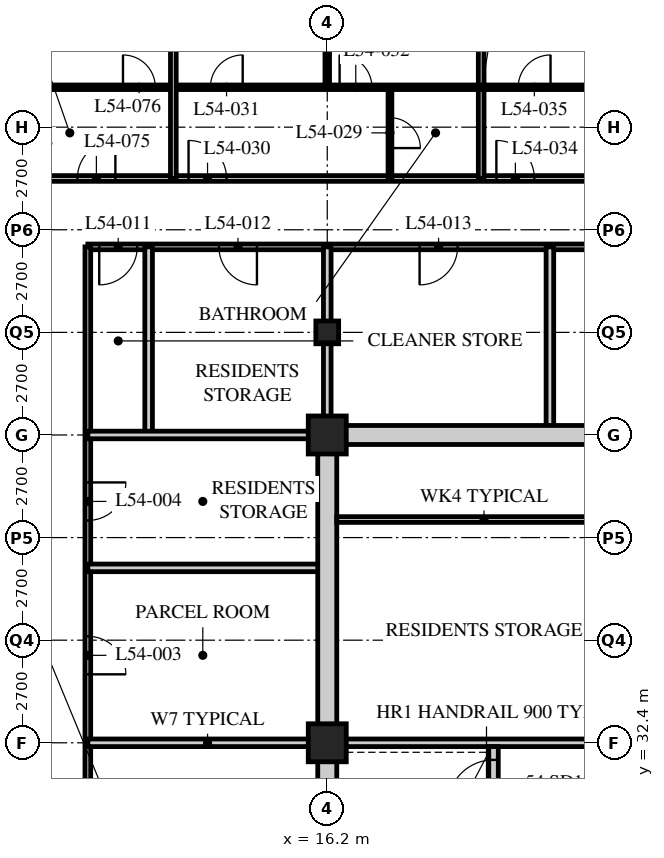
"""IFC4 building model, lengths in metres.
Left out: names, types, materials, properties, quantities, classifications, styles, units other than length and angle.
Written with IfcOpenShell. Run it as: python <this file> out.ifc"""

import sys

from ifc_helpers import new_model, si_unit, direction, frame, frame_2d, origin, origin_2d, place, context, subcontext, project, spatial, rectangle, hollow_rectangle, extrude, element, fill, save


model = new_model("IFC4")
c1 = context("Model", 3, precision=1e-05, world=origin(), true_north=direction((0.0, 1.0)))
c2 = subcontext(c1, "Body", "Model", "MODEL_VIEW")
j1 = project(units=[si_unit("LENGTHUNIT", "METRE"), si_unit("PLANEANGLEUNIT", "RADIAN")], contexts=[c1])
p1 = place(None, origin())
s1 = spatial("IfcSite", under=j1, at=p1, CompositionType="ELEMENT")
p2 = place(p1, origin())
s2 = spatial("IfcBuilding", under=s1, at=p2, CompositionType="ELEMENT")
p3 = place(p2, frame((0.0, 0.0, 210.0)))
s3 = spatial("IfcBuildingStorey", under=s2, at=p3, CompositionType="ELEMENT", Elevation=210.0)
for number, where, z_axis, x_axis in (
    (1, (16.2, 32.4, 0.0), (0.0, 0.0, 1.0), (1.0, 0.0, 0.0)),
    (2, (16.2, 40.5, 0.0), (0.0, 0.0, 1.0), (1.0, 0.0, 0.0)),
):
    element("IfcColumn", number, at=place(p3, frame(where, z_axis=z_axis, x_axis=x_axis)), inside=s3, PredefinedType="COLUMN", context=c2, shape_type="SweptSolid", body=[
        extrude(hollow_rectangle(XDim=1.0, YDim=1.0, WallThickness=0.1, at=origin_2d()), origin(), (0.0, 0.0, 1.0), 3.6),
    ])
p4 = place(p3, frame((16.2, 43.2, 0.0), z_axis=(0.0, 0.0, 1.0), x_axis=(1.0, 0.0, 0.0)))
e3 = element("IfcColumn", 3, at=p4, inside=s3, PredefinedType="COLUMN", context=c2, shape_type="SweptSolid", body=[
    extrude(hollow_rectangle(XDim=0.6, YDim=0.6, WallThickness=0.05, at=origin_2d()), origin(), (0.0, 0.0, 1.0), 3.6),
])
p5 = place(p3, frame((8.1, 47.25, 0.0), z_axis=(0.0, 0.0, 1.0), x_axis=(1.0, 0.0, 0.0)))
e4 = element("IfcWall", 4, at=p5, inside=s3, PredefinedType="PARTITIONING", context=c2, shape_type="SweptSolid", body=[
    extrude(rectangle(XDim=36.45, YDim=0.15, at=frame_2d((18.225, 0.0))), origin(), (0.0, 0.0, 1.0), 3.39),
])
p6 = place(p5, frame((4.45, 0.0, 0.0)))
e5 = element("IfcOpeningElement", 5, at=p6, cuts=e4, PredefinedType="OPENING", context=c2, shape_type="SweptSolid", body=[
    extrude(rectangle(XDim=1.0, YDim=2.1, at=frame_2d((0.5, 1.05))), frame((0.0, 0.085, 0.0), z_axis=(0.0, -1.0, 0.0), x_axis=(1.0, 0.0, 0.0)), (0.0, 0.0, 1.0), 0.17),
])
p7 = place(p5, frame((12.55, 0.0, 0.0)))
e6 = element("IfcOpeningElement", 6, at=p7, cuts=e4, PredefinedType="OPENING", context=c2, shape_type="SweptSolid", body=[
    extrude(rectangle(XDim=1.0, YDim=2.1, at=frame_2d((0.5, 1.05))), frame((0.0, 0.085, 0.0), z_axis=(0.0, -1.0, 0.0), x_axis=(1.0, 0.0, 0.0)), (0.0, 0.0, 1.0), 0.17),
])
p8 = place(p5, frame((30.7, 0.0, 0.0)))
e7 = element("IfcOpeningElement", 7, at=p8, cuts=e4, PredefinedType="OPENING", context=c2, shape_type="SweptSolid", body=[
    extrude(rectangle(XDim=1.0, YDim=2.1, at=frame_2d((0.5, 1.05))), frame((0.0, 0.085, 0.0), z_axis=(0.0, -1.0, 0.0), x_axis=(1.0, 0.0, 0.0)), (0.0, 0.0, 1.0), 0.17),
])
p9 = place(p5, frame((33.925, 0.0, 0.0)))
e8 = element("IfcOpeningElement", 8, at=p9, cuts=e4, PredefinedType="OPENING", context=c2, shape_type="SweptSolid", body=[
    extrude(rectangle(XDim=1.0, YDim=2.1, at=frame_2d((0.5, 1.05))), frame((0.0, 0.085, 0.0), z_axis=(0.0, -1.0, 0.0), x_axis=(1.0, 0.0, 0.0)), (0.0, 0.0, 1.0), 0.17),
])
p10 = place(p5, frame((1.525, 0.0, 0.0)))
e9 = element("IfcOpeningElement", 9, at=p10, cuts=e4, PredefinedType="OPENING", context=c2, shape_type="SweptSolid", body=[
    extrude(rectangle(XDim=1.0, YDim=2.1, at=frame_2d((0.5, 1.05))), frame((0.0, 0.085, 0.0), z_axis=(0.0, -1.0, 0.0), x_axis=(1.0, 0.0, 0.0)), (0.0, 0.0, 1.0), 0.17),
])
p11 = place(p3, frame((27.14, 45.45, 0.0), z_axis=(0.0, 0.0, 1.0), x_axis=(-1.0, 0.0, 0.0)))
e10 = element("IfcWall", 10, at=p11, inside=s3, PredefinedType="PARTITIONING", context=c2, shape_type="SweptSolid", body=[
    extrude(rectangle(XDim=17.24, YDim=0.15, at=frame_2d((8.62, 0.0))), origin(), (0.0, 0.0, 1.0), 3.39),
])
p12 = place(p11, frame((15.94, 0.0, 0.0)))
e11 = element("IfcOpeningElement", 11, at=p12, cuts=e10, PredefinedType="OPENING", context=c2, shape_type="SweptSolid", body=[
    extrude(rectangle(XDim=1.0, YDim=2.1, at=frame_2d((0.5, 1.05))), frame((0.0, 0.085, 0.0), z_axis=(0.0, -1.0, 0.0), x_axis=(1.0, 0.0, 0.0)), (0.0, 0.0, 1.0), 0.17),
])
p13 = place(p11, frame((12.79, 0.0, 0.0)))
e12 = element("IfcOpeningElement", 12, at=p13, cuts=e10, PredefinedType="OPENING", context=c2, shape_type="SweptSolid", body=[
    extrude(rectangle(XDim=1.0, YDim=2.1, at=frame_2d((0.5, 1.05))), frame((0.0, 0.085, 0.0), z_axis=(0.0, -1.0, 0.0), x_axis=(1.0, 0.0, 0.0)), (0.0, 0.0, 1.0), 0.17),
])
p14 = place(p11, frame((7.511, 0.0, 0.0)))
e13 = element("IfcOpeningElement", 13, at=p14, cuts=e10, PredefinedType="OPENING", context=c2, shape_type="SweptSolid", body=[
    extrude(rectangle(XDim=1.0, YDim=2.1, at=frame_2d((0.5, 1.05))), frame((0.0, 0.085, 0.0), z_axis=(0.0, -1.0, 0.0), x_axis=(1.0, 0.0, 0.0)), (0.0, 0.0, 1.0), 0.17),
])
p15 = place(p11, frame((2.036, 0.0, 0.0)))
e14 = element("IfcOpeningElement", 14, at=p15, cuts=e10, PredefinedType="OPENING", context=c2, shape_type="SweptSolid", body=[
    extrude(rectangle(XDim=1.0, YDim=2.1, at=frame_2d((0.5, 1.05))), frame((0.0, 0.085, 0.0), z_axis=(0.0, -1.0, 0.0), x_axis=(1.0, 0.0, 0.0)), (0.0, 0.0, 1.0), 0.17),
])
p16 = place(p3, frame((9.9, 45.45, 0.0), z_axis=(0.0, 0.0, 1.0), x_axis=(0.0, -1.0, 0.0)))
e15 = element("IfcWall", 15, at=p16, inside=s3, PredefinedType="PARTITIONING", context=c2, shape_type="SweptSolid", body=[
    extrude(rectangle(XDim=24.75, YDim=0.15, at=frame_2d((12.375, 0.0))), origin(), (0.0, 0.0, 1.0), 3.39),
])
p17 = place(p16, frame((19.698, 0.0, 0.0)))
e16 = element("IfcOpeningElement", 16, at=p17, cuts=e15, PredefinedType="OPENING", context=c2, shape_type="SweptSolid", body=[
    extrude(rectangle(XDim=1.0, YDim=2.1, at=frame_2d((0.5, 1.05))), frame((0.0, 0.085, 0.0), z_axis=(0.0, -1.0, 0.0), x_axis=(1.0, 0.0, 0.0)), (0.0, 0.0, 1.0), 0.17),
])
p18 = place(p16, frame((15.648, 0.0, 0.0)))
e17 = element("IfcOpeningElement", 17, at=p18, cuts=e15, PredefinedType="OPENING", context=c2, shape_type="SweptSolid", body=[
    extrude(rectangle(XDim=1.0, YDim=2.1, at=frame_2d((0.5, 1.05))), frame((0.0, 0.085, 0.0), z_axis=(0.0, -1.0, 0.0), x_axis=(1.0, 0.0, 0.0)), (0.0, 0.0, 1.0), 0.17),
])
p19 = place(p16, frame((10.248, 0.0, 0.0)))
e18 = element("IfcOpeningElement", 18, at=p19, cuts=e15, PredefinedType="OPENING", context=c2, shape_type="SweptSolid", body=[
    extrude(rectangle(XDim=1.0, YDim=2.1, at=frame_2d((0.5, 1.05))), frame((0.0, 0.085, 0.0), z_axis=(0.0, -1.0, 0.0), x_axis=(1.0, 0.0, 0.0)), (0.0, 0.0, 1.0), 0.17),
])
p20 = place(p16, frame((6.198, 0.0, 0.0)))
e19 = element("IfcOpeningElement", 19, at=p20, cuts=e15, PredefinedType="OPENING", context=c2, shape_type="SweptSolid", body=[
    extrude(rectangle(XDim=1.0, YDim=2.1, at=frame_2d((0.5, 1.05))), frame((0.0, 0.085, 0.0), z_axis=(0.0, -1.0, 0.0), x_axis=(1.0, 0.0, 0.0)), (0.0, 0.0, 1.0), 0.17),
])
for number, where, z_axis, x_axis in (
    (20, (9.9, 32.4, 0.0), (0.0, 0.0, 1.0), (1.0, 0.0, 0.0)),
    (21, (9.9, 37.003, 0.0), (0.0, 0.0, 1.0), (1.0, 0.0, 0.0)),
):
    element("IfcWall", number, at=place(p3, frame(where, z_axis=z_axis, x_axis=x_axis)), inside=s3, PredefinedType="SOLIDWALL", context=c2, shape_type="SweptSolid", body=[
        extrude(rectangle(XDim=6.3, YDim=0.2, at=frame_2d((3.15, 0.0))), origin(), (0.0, 0.0, 1.0), 3.39),
    ])
p21 = place(p3, frame((16.2, 40.5, 0.0), z_axis=(0.0, 0.0, 1.0), x_axis=(0.0, 1.0, 0.0)))
e22 = element("IfcWall", 22, at=p21, inside=s3, PredefinedType="SOLIDWALL", context=c2, shape_type="SweptSolid", body=[
    extrude(rectangle(XDim=4.95, YDim=0.2, at=frame_2d((2.475, 0.0))), origin(), (0.0, 0.0, 1.0), 2.69),
])
for number, where, z_axis, x_axis in (
    (23, (11.5, 45.45, 0.0), (0.0, 0.0, 1.0), (0.0, -1.0, 0.0)),
    (24, (22.059, 45.45, 0.0), (0.0, 0.0, 1.0), (0.0, -1.0, 0.0)),
):
    element("IfcWall", number, at=place(p3, frame(where, z_axis=z_axis, x_axis=x_axis)), inside=s3, PredefinedType="SOLIDWALL", context=c2, shape_type="SweptSolid", body=[
        extrude(rectangle(XDim=4.95, YDim=0.2, at=frame_2d((2.475, 0.0))), origin(), (0.0, 0.0, 1.0), 3.39),
    ])
p22 = place(p3, frame((9.9, 40.5, 0.0), z_axis=(0.0, 0.0, 1.0), x_axis=(1.0, 0.0, 0.0)))
e25 = element("IfcWall", 25, at=p22, inside=s3, PredefinedType="SOLIDWALL", context=c2, shape_type="SweptSolid", body=[
    extrude(rectangle(XDim=6.3, YDim=0.2, at=frame_2d((3.15, 0.0))), origin(), (0.0, 0.0, 1.0), 3.39),
])
p23 = place(p3, frame((17.85, 47.25, 0.0), z_axis=(0.0, 0.0, 1.0), x_axis=(0.0, 1.0, 0.0)))
e26 = element("IfcWall", 26, at=p23, inside=s3, PredefinedType="PARTITIONING", context=c2, shape_type="SweptSolid", body=[
    extrude(rectangle(XDim=2.4, YDim=0.1, at=frame_2d((1.2, 0.0))), origin(), (0.0, 0.0, 1.0), 3.39),
])
p24 = place(p23, frame((0.8, 0.0, 0.0)))
e27 = element("IfcOpeningElement", 27, at=p24, cuts=e26, PredefinedType="OPENING", context=c2, shape_type="SweptSolid", body=[
    extrude(rectangle(XDim=0.8, YDim=2.1, at=frame_2d((0.4, 1.05))), frame((0.0, 0.06, 0.0), z_axis=(0.0, -1.0, 0.0), x_axis=(1.0, 0.0, 0.0)), (0.0, 0.0, 1.0), 0.12),
])
p25 = place(p3, frame((16.2, 49.65, 0.0), z_axis=(0.0, 0.0, 1.0), x_axis=(0.0, 1.0, 0.0)))
e28 = element("IfcWall", 28, at=p25, inside=s3, PredefinedType="PARTITIONING", context=c2, shape_type="SweptSolid", body=[
    extrude(rectangle(XDim=9.45, YDim=0.12, at=frame_2d((4.725, 0.0))), origin(), (0.0, 0.0, 1.0), 2.778),
])
p26 = place(p3, frame((20.25, 47.25, 0.0), z_axis=(0.0, 0.0, 1.0), x_axis=(0.0, 1.0, 0.0)))
e29 = element("IfcWall", 29, at=p26, inside=s3, PredefinedType="PARTITIONING", context=c2, shape_type="SweptSolid", body=[
    extrude(rectangle(XDim=11.85, YDim=0.15, at=frame_2d((5.925, 0.0))), origin(), (0.0, 0.0, 1.0), 3.39),
])
p27 = place(p3, frame((4.1, 49.65, 0.0), z_axis=(0.0, 0.0, 1.0), x_axis=(1.0, 0.0, 0.0)))
e30 = element("IfcWall", 30, at=p27, inside=s3, PredefinedType="PARTITIONING", context=c2, shape_type="SweptSolid", body=[
    extrude(rectangle(XDim=32.35, YDim=0.12, at=frame_2d((16.175, 0.0))), origin(), (0.0, 0.0, 1.0), 3.39),
])
p28 = place(p27, frame((9.025, 0.0, 0.0)))
e31 = element("IfcOpeningElement", 31, at=p28, cuts=e30, PredefinedType="OPENING", context=c2, shape_type="SweptSolid", body=[
    extrude(rectangle(XDim=0.85, YDim=2.1, at=frame_2d((0.425, 1.05))), frame((0.0, 0.07, 0.0), z_axis=(0.0, -1.0, 0.0), x_axis=(1.0, 0.0, 0.0)), (0.0, 0.0, 1.0), 0.14),
])
p29 = place(p27, frame((12.425, 0.0, 0.0)))
e32 = element("IfcOpeningElement", 32, at=p29, cuts=e30, PredefinedType="OPENING", context=c2, shape_type="SweptSolid", body=[
    extrude(rectangle(XDim=0.85, YDim=2.1, at=frame_2d((0.425, 1.05))), frame((0.0, 0.07, 0.0), z_axis=(0.0, -1.0, 0.0), x_axis=(1.0, 0.0, 0.0)), (0.0, 0.0, 1.0), 0.14),
])
p30 = place(p27, frame((17.125, 0.0, 0.0)))
e33 = element("IfcOpeningElement", 33, at=p30, cuts=e30, PredefinedType="OPENING", context=c2, shape_type="SweptSolid", body=[
    extrude(rectangle(XDim=0.85, YDim=2.1, at=frame_2d((0.425, 1.05))), frame((0.0, 0.07, 0.0), z_axis=(0.0, -1.0, 0.0), x_axis=(1.0, 0.0, 0.0)), (0.0, 0.0, 1.0), 0.14),
])
p31 = place(p27, frame((24.575, 0.0, 0.0)))
e34 = element("IfcOpeningElement", 34, at=p31, cuts=e30, PredefinedType="OPENING", context=c2, shape_type="SweptSolid", body=[
    extrude(rectangle(XDim=0.85, YDim=2.1, at=frame_2d((0.425, 1.05))), frame((0.0, 0.07, 0.0), z_axis=(0.0, -1.0, 0.0), x_axis=(1.0, 0.0, 0.0)), (0.0, 0.0, 1.0), 0.14),
])
p32 = place(p27, frame((28.625, 0.0, 0.0)))
e35 = element("IfcOpeningElement", 35, at=p32, cuts=e30, PredefinedType="OPENING", context=c2, shape_type="SweptSolid", body=[
    extrude(rectangle(XDim=0.85, YDim=2.1, at=frame_2d((0.425, 1.05))), frame((0.0, 0.07, 0.0), z_axis=(0.0, -1.0, 0.0), x_axis=(1.0, 0.0, 0.0)), (0.0, 0.0, 1.0), 0.14),
])
p33 = place(p27, frame((6.725, 0.0, 0.0)))
e36 = element("IfcOpeningElement", 36, at=p33, cuts=e30, PredefinedType="OPENING", context=c2, shape_type="SweptSolid", body=[
    extrude(rectangle(XDim=0.85, YDim=2.1, at=frame_2d((0.425, 1.05))), frame((0.0, 0.07, 0.0), z_axis=(0.0, -1.0, 0.0), x_axis=(1.0, 0.0, 0.0)), (0.0, 0.0, 1.0), 0.14),
])
p34 = place(p27, frame((2.875, 0.0, 0.0)))
e37 = element("IfcOpeningElement", 37, at=p34, cuts=e30, PredefinedType="OPENING", context=c2, shape_type="SweptSolid", body=[
    extrude(rectangle(XDim=0.85, YDim=2.1, at=frame_2d((0.425, 1.05))), frame((0.0, 0.07, 0.0), z_axis=(0.0, -1.0, 0.0), x_axis=(1.0, 0.0, 0.0)), (0.0, 0.0, 1.0), 0.14),
])
p35 = place(p3, frame((12.15, 47.25, 0.0), z_axis=(0.0, 0.0, 1.0), x_axis=(0.0, 1.0, 0.0)))
e38 = element("IfcWall", 38, at=p35, inside=s3, PredefinedType="PARTITIONING", context=c2, shape_type="SweptSolid", body=[
    extrude(rectangle(XDim=11.85, YDim=0.15, at=frame_2d((5.925, 0.0))), origin(), (0.0, 0.0, 1.0), 3.39),
])
p36 = place(p3, frame((15.95, 40.5, 0.0), z_axis=(0.0, 0.0, 1.0), x_axis=(1.0, 0.0, 0.0)))
e39 = element("IfcWall", 39, at=p36, inside=s3, PredefinedType="SOLIDWALL", context=c2, shape_type="SweptSolid", body=[
    extrude(rectangle(XDim=24.8, YDim=0.5, at=frame_2d((12.4, 0.0))), origin(), (0.0, 0.0, 1.0), 2.74),
])
p37 = place(p36, frame((11.5, 0.0, 0.0)))
e40 = element("IfcOpeningElement", 40, at=p37, cuts=e39, PredefinedType="OPENING", context=c2, shape_type="SweptSolid", body=[
    extrude(rectangle(XDim=1.8, YDim=2.4, at=frame_2d((0.9, 1.2))), frame((0.0, 0.26, 0.0), z_axis=(0.0, -1.0, 0.0), x_axis=(1.0, 0.0, 0.0)), (0.0, 0.0, 1.0), 0.52),
])
p38 = place(p3, frame((16.2, 24.55, 0.0), z_axis=(0.0, 0.0, 1.0), x_axis=(0.0, 1.0, 0.0)))
e41 = element("IfcWall", 41, at=p38, inside=s3, PredefinedType="SOLIDWALL", context=c2, shape_type="SweptSolid", body=[
    extrude(rectangle(XDim=15.7, YDim=0.5, at=frame_2d((7.85, 0.0))), origin(), (0.0, 0.0, 1.0), 2.778),
])
p39 = place(p3, frame((16.45, 32.4, 0.0), z_axis=(0.0, 0.0, 1.0), x_axis=(1.0, 0.0, 0.0)))
e42 = element("IfcWall", 42, at=p39, inside=s3, PredefinedType="SOLIDWALL", context=c2, shape_type="SweptSolid", body=[
    extrude(rectangle(XDim=7.95, YDim=0.2, at=frame_2d((3.975, 0.0))), origin(), (0.0, 0.0, 1.0), 2.778),
])
p40 = place(p3, frame((20.575, 24.55, 0.0), z_axis=(0.0, 0.0, 1.0), x_axis=(0.0, 1.0, 0.0)))
e43 = element("IfcWall", 43, at=p40, inside=s3, PredefinedType="SOLIDWALL", context=c2, shape_type="SweptSolid", body=[
    extrude(rectangle(XDim=7.75, YDim=0.25, at=frame_2d((3.875, 0.0))), origin(), (0.0, 0.0, 1.0), 3.39),
])
p41 = place(p40, frame((6.2, 0.0, 0.0)))
e44 = element("IfcOpeningElement", 44, at=p41, cuts=e43, PredefinedType="OPENING", context=c2, shape_type="SweptSolid", body=[
    extrude(rectangle(XDim=1.2, YDim=2.1, at=frame_2d((0.6, 1.05))), frame((0.0, 0.135, 0.0), z_axis=(0.0, -1.0, 0.0), x_axis=(1.0, 0.0, 0.0)), (0.0, 0.0, 1.0), 0.27),
])
p42 = place(p3, frame((16.45, 38.275, 0.0), z_axis=(0.0, 0.0, 1.0), x_axis=(1.0, 0.0, 0.0)))
e45 = element("IfcWall", 45, at=p42, inside=s3, PredefinedType="PARTITIONING", context=c2, shape_type="SweptSolid", body=[
    extrude(rectangle(XDim=7.75, YDim=0.15, at=frame_2d((3.875, 0.0))), origin(), (0.0, 0.0, 1.0), 3.39),
])
p43 = place(p19, origin())
e46 = element("IfcDoor", 46, at=p43, inside=s3, OperationType="SINGLE_SWING_RIGHT", PredefinedType="DOOR", context=c2, shape_type="SweptSolid", body=[
    extrude(rectangle(XDim=1.0, YDim=2.1, at=frame_2d((0.5, 1.05))), frame((0.0, 0.025, 0.0), z_axis=(0.0, -1.0, 0.0), x_axis=(1.0, 0.0, 0.0)), (0.0, 0.0, 1.0), 0.05),
])
fill(e18, e46)
p44 = place(p20, origin())
e47 = element("IfcDoor", 47, at=p44, inside=s3, OperationType="SINGLE_SWING_LEFT", PredefinedType="DOOR", context=c2, shape_type="SweptSolid", body=[
    extrude(rectangle(XDim=1.0, YDim=2.1, at=frame_2d((0.5, 1.05))), frame((0.0, 0.025, 0.0), z_axis=(0.0, -1.0, 0.0), x_axis=(1.0, 0.0, 0.0)), (0.0, 0.0, 1.0), 0.05),
])
fill(e19, e47)
p45 = place(p12, origin())
e48 = element("IfcDoor", 48, at=p45, inside=s3, OperationType="SINGLE_SWING_RIGHT", PredefinedType="DOOR", context=c2, shape_type="SweptSolid", body=[
    extrude(rectangle(XDim=1.0, YDim=2.1, at=frame_2d((0.5, 1.05))), frame((0.0, 0.025, 0.0), z_axis=(0.0, -1.0, 0.0), x_axis=(1.0, 0.0, 0.0)), (0.0, 0.0, 1.0), 0.05),
])
fill(e11, e48)
p46 = place(p13, origin())
e49 = element("IfcDoor", 49, at=p46, inside=s3, OperationType="SINGLE_SWING_LEFT", PredefinedType="DOOR", context=c2, shape_type="SweptSolid", body=[
    extrude(rectangle(XDim=1.0, YDim=2.1, at=frame_2d((0.5, 1.05))), frame((0.0, 0.025, 0.0), z_axis=(0.0, -1.0, 0.0), x_axis=(1.0, 0.0, 0.0)), (0.0, 0.0, 1.0), 0.05),
])
fill(e12, e49)
p47 = place(p14, origin())
e50 = element("IfcDoor", 50, at=p47, inside=s3, OperationType="SINGLE_SWING_RIGHT", PredefinedType="DOOR", context=c2, shape_type="SweptSolid", body=[
    extrude(rectangle(XDim=1.0, YDim=2.1, at=frame_2d((0.5, 1.05))), frame((0.0, 0.025, 0.0), z_axis=(0.0, -1.0, 0.0), x_axis=(1.0, 0.0, 0.0)), (0.0, 0.0, 1.0), 0.05),
])
fill(e13, e50)
p48 = place(p24, origin())
e51 = element("IfcDoor", 51, at=p48, inside=s3, OperationType="SINGLE_SWING_RIGHT", PredefinedType="DOOR", context=c2, shape_type="SweptSolid", body=[
    extrude(rectangle(XDim=0.8, YDim=2.1, at=frame_2d((0.4, 1.05))), frame((0.0, 0.025, 0.0), z_axis=(0.0, -1.0, 0.0), x_axis=(1.0, 0.0, 0.0)), (0.0, 0.0, 1.0), 0.05),
])
fill(e27, e51)
p49 = place(p6, origin())
e52 = element("IfcDoor", 52, at=p49, inside=s3, OperationType="SINGLE_SWING_LEFT", PredefinedType="DOOR", context=c2, shape_type="SweptSolid", body=[
    extrude(rectangle(XDim=1.0, YDim=2.1, at=frame_2d((0.5, 1.05))), frame((0.0, 0.025, 0.0), z_axis=(0.0, -1.0, 0.0), x_axis=(1.0, 0.0, 0.0)), (0.0, 0.0, 1.0), 0.05),
])
fill(e5, e52)
p50 = place(p28, origin())
e53 = element("IfcDoor", 53, at=p50, inside=s3, OperationType="SINGLE_SWING_RIGHT", PredefinedType="DOOR", context=c2, shape_type="SweptSolid", body=[
    extrude(rectangle(XDim=0.85, YDim=2.1, at=frame_2d((0.425, 1.05))), frame((0.0, 0.025, 0.0), z_axis=(0.0, -1.0, 0.0), x_axis=(1.0, 0.0, 0.0)), (0.0, 0.0, 1.0), 0.05),
])
fill(e31, e53)
p51 = place(p29, origin())
e54 = element("IfcDoor", 54, at=p51, inside=s3, OperationType="SINGLE_SWING_LEFT", PredefinedType="DOOR", context=c2, shape_type="SweptSolid", body=[
    extrude(rectangle(XDim=0.85, YDim=2.1, at=frame_2d((0.425, 1.05))), frame((0.0, 0.025, 0.0), z_axis=(0.0, -1.0, 0.0), x_axis=(1.0, 0.0, 0.0)), (0.0, 0.0, 1.0), 0.05),
])
fill(e32, e54)
p52 = place(p7, origin())
e55 = element("IfcDoor", 55, at=p52, inside=s3, OperationType="SINGLE_SWING_LEFT", PredefinedType="DOOR", context=c2, shape_type="SweptSolid", body=[
    extrude(rectangle(XDim=1.0, YDim=2.1, at=frame_2d((0.5, 1.05))), frame((0.0, 0.025, 0.0), z_axis=(0.0, -1.0, 0.0), x_axis=(1.0, 0.0, 0.0)), (0.0, 0.0, 1.0), 0.05),
])
fill(e6, e55)
p53 = place(p30, origin())
e56 = element("IfcDoor", 56, at=p53, inside=s3, OperationType="SINGLE_SWING_RIGHT", PredefinedType="DOOR", context=c2, shape_type="SweptSolid", body=[
    extrude(rectangle(XDim=0.85, YDim=2.1, at=frame_2d((0.425, 1.05))), frame((0.0, 0.025, 0.0), z_axis=(0.0, -1.0, 0.0), x_axis=(1.0, 0.0, 0.0)), (0.0, 0.0, 1.0), 0.05),
])
fill(e33, e56)
p54 = place(p10, origin())
e57 = element("IfcDoor", 57, at=p54, inside=s3, OperationType="SINGLE_SWING_RIGHT", PredefinedType="DOOR", context=c2, shape_type="SweptSolid", body=[
    extrude(rectangle(XDim=1.0, YDim=2.1, at=frame_2d((0.5, 1.05))), frame((0.0, 0.025, 0.0), z_axis=(0.0, -1.0, 0.0), x_axis=(1.0, 0.0, 0.0)), (0.0, 0.0, 1.0), 0.05),
])
fill(e9, e57)
p55 = place(p33, origin())
e58 = element("IfcDoor", 58, at=p55, inside=s3, OperationType="SINGLE_SWING_LEFT", PredefinedType="DOOR", context=c2, shape_type="SweptSolid", body=[
    extrude(rectangle(XDim=0.85, YDim=2.1, at=frame_2d((0.425, 1.05))), frame((0.0, 0.025, 0.0), z_axis=(0.0, -1.0, 0.0), x_axis=(1.0, 0.0, 0.0)), (0.0, 0.0, 1.0), 0.05),
])
fill(e36, e58)
p56 = place(p41, origin())
e59 = element("IfcDoor", 59, at=p56, inside=s3, OperationType="SINGLE_SWING_LEFT", PredefinedType="DOOR", context=c2, shape_type="SweptSolid", body=[
    extrude(rectangle(XDim=1.2, YDim=2.1, at=frame_2d((0.6, 1.05))), frame((0.0, 0.025, 0.0), z_axis=(0.0, -1.0, 0.0), x_axis=(1.0, 0.0, 0.0)), (0.0, 0.0, 1.0), 0.05),
])
fill(e44, e59)
save(model, sys.argv[1])
